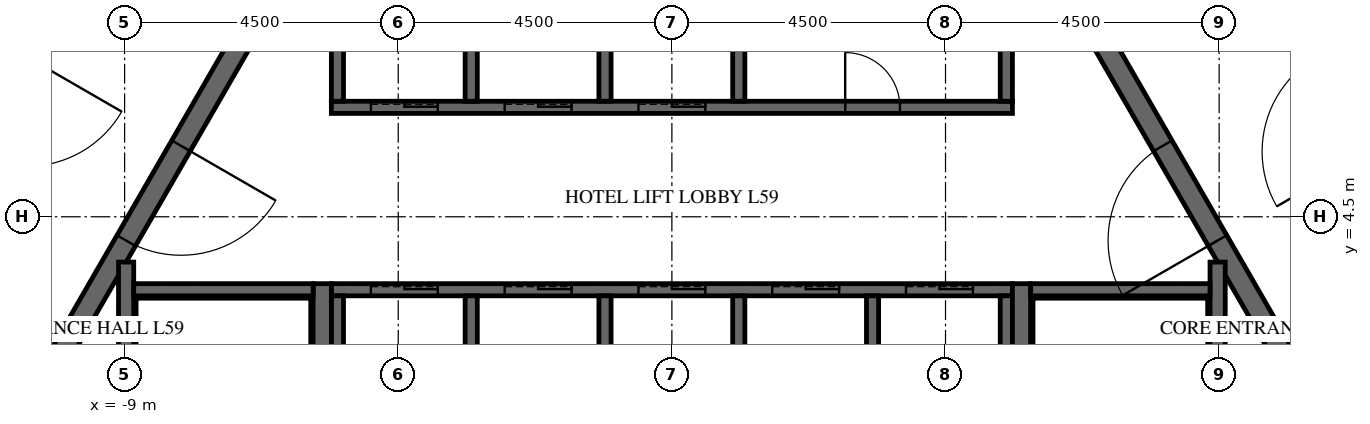
"""IFC4 building model, lengths in metres.
Left out: names, types, materials, properties, quantities, classifications, styles, units other than length and angle.
Written with IfcOpenShell. Run it as: python <this file> out.ifc"""

import sys

from ifc_helpers import new_model, si_unit, direction, frame, frame_2d, origin, place, context, subcontext, project, spatial, polyline, rectangle, outline, extrude, element, fill, save


model = new_model("IFC4")
c1 = context("Model", 3, precision=1e-05, world=origin(), true_north=direction((0.0, 1.0)))
c2 = subcontext(c1, "Body", "Model", "MODEL_VIEW")
j1 = project(units=[si_unit("LENGTHUNIT", "METRE"), si_unit("PLANEANGLEUNIT", "RADIAN")], contexts=[c1])
p1 = place(None, origin())
s1 = spatial("IfcSite", under=j1, at=p1, CompositionType="ELEMENT")
p2 = place(p1, origin())
s2 = spatial("IfcBuilding", under=s1, at=p2, CompositionType="ELEMENT")
p3 = place(p2, frame((0.0, 0.0, 246.3)))
s3 = spatial("IfcBuildingStorey", under=s2, at=p3, CompositionType="ELEMENT", Elevation=246.3)
p4 = place(p3, frame((-7.361, 12.75, -0.15), z_axis=(0.0, 0.0, 1.0), x_axis=(-0.50000571537, -0.866022103989, 0.0)))
e1 = element("IfcWall", 1, at=p4, inside=s3, PredefinedType="SHEAR", context=c2, shape_type="SweptSolid", body=[
    extrude(outline(polyline([(-0.144, -0.25), (14.867, -0.25), (14.578, 0.25), (0.144, 0.25), (-0.144, -0.25)])), origin(), (0.0, 0.0, 1.0), 3.75),
])
p5 = place(p4, frame((6.49, 0.0, 0.15)))
e2 = element("IfcOpeningElement", 2, at=p5, cuts=e1, PredefinedType="OPENING", context=c2, shape_type="SweptSolid", body=[
    extrude(rectangle(XDim=1.8, YDim=2.4, at=frame_2d((0.9, 1.2))), frame((0.0, 0.26, 0.0), z_axis=(0.0, -1.0, 0.0), x_axis=(1.0, 0.0, 0.0)), (0.0, 0.0, 1.0), 0.52),
])
p6 = place(p3, frame((14.722, 0.0, -0.15), z_axis=(0.0, 0.0, 1.0), x_axis=(-0.50000571537, 0.866022103989, 0.0)))
e3 = element("IfcWall", 3, at=p6, inside=s3, PredefinedType="SHEAR", context=c2, shape_type="SweptSolid", body=[
    extrude(outline(polyline([(-0.144, -0.25), (14.867, -0.25), (14.578, 0.25), (0.144, 0.25), (-0.144, -0.25)])), origin(), (0.0, 0.0, 1.0), 3.75),
])
p7 = place(p6, frame((6.432, 0.0, 0.15)))
e4 = element("IfcOpeningElement", 4, at=p7, cuts=e3, PredefinedType="OPENING", context=c2, shape_type="SweptSolid", body=[
    extrude(rectangle(XDim=1.8, YDim=2.4, at=frame_2d((0.9, 1.2))), frame((0.0, 0.26, 0.0), z_axis=(0.0, -1.0, 0.0), x_axis=(1.0, 0.0, 0.0)), (0.0, 0.0, 1.0), 0.52),
])
p8 = place(p3, frame((-5.673, 9.825, -0.15), z_axis=(0.0, 0.0, 1.0), x_axis=(-0.499995046907, -0.866028263435, 0.0)))
e5 = element("IfcWall", 5, at=p8, inside=s3, PredefinedType="SHEAR", context=c2, shape_type="SweptSolid", body=[
    extrude(outline(polyline([(-0.101, -0.175), (11.446, -0.175), (11.244, 0.175), (0.101, 0.175), (-0.101, -0.175)])), origin(), (0.0, 0.0, 1.0), 3.75),
])
p9 = place(p8, frame((4.801, 0.0, 0.15)))
e6 = element("IfcOpeningElement", 6, at=p9, cuts=e5, PredefinedType="OPENING", context=c2, shape_type="SweptSolid", body=[
    extrude(rectangle(XDim=1.8, YDim=2.4, at=frame_2d((0.9, 1.2))), frame((0.0, 0.185, 0.0), z_axis=(0.0, -1.0, 0.0), x_axis=(1.0, 0.0, 0.0)), (0.0, 0.0, 1.0), 0.37),
])
p10 = place(p3, frame((11.345, 0.0, -0.15), z_axis=(0.0, 0.0, 1.0), x_axis=(-0.499995046907, 0.866028263435, 0.0)))
e7 = element("IfcWall", 7, at=p10, inside=s3, PredefinedType="SHEAR", context=c2, shape_type="SweptSolid", body=[
    extrude(outline(polyline([(-0.101, -0.175), (11.446, -0.175), (11.244, 0.175), (0.101, 0.175), (-0.101, -0.175)])), origin(), (0.0, 0.0, 1.0), 3.75),
])
p11 = place(p10, frame((4.744, 0.0, 0.15)))
e8 = element("IfcOpeningElement", 8, at=p11, cuts=e7, PredefinedType="OPENING", context=c2, shape_type="SweptSolid", body=[
    extrude(rectangle(XDim=1.8, YDim=2.4, at=frame_2d((0.9, 1.2))), frame((0.0, 0.185, 0.0), z_axis=(0.0, -1.0, 0.0), x_axis=(1.0, 0.0, 0.0)), (0.0, 0.0, 1.0), 0.37),
])
p12 = place(p3, frame((-5.6, 6.3, -0.25), z_axis=(0.0, 0.0, 1.0), x_axis=(1.0, 0.0, 0.0)))
e9 = element("IfcWall", 9, at=p12, inside=s3, PredefinedType="SHEAR", context=c2, shape_type="SweptSolid", body=[
    extrude(rectangle(XDim=11.2, YDim=0.2, at=frame_2d((5.6, 0.0))), origin(), (0.0, 0.0, 1.0), 3.9),
])
p13 = place(p12, frame((8.45, 0.0, 0.25)))
e10 = element("IfcOpeningElement", 10, at=p13, cuts=e9, PredefinedType="OPENING", context=c2, shape_type="SweptSolid", body=[
    extrude(rectangle(XDim=0.9, YDim=2.1, at=frame_2d((0.45, 1.05))), frame((0.0, 0.11, 0.0), z_axis=(0.0, -1.0, 0.0), x_axis=(1.0, 0.0, 0.0)), (0.0, 0.0, 1.0), 0.22),
])
p14 = place(p12, frame((0.65, 0.0, 0.25)))
e11 = element("IfcOpeningElement", 11, at=p14, cuts=e9, PredefinedType="OPENING", context=c2, shape_type="SweptSolid", body=[
    extrude(rectangle(XDim=1.1, YDim=2.1, at=frame_2d((0.55, 1.05))), frame((0.0, 0.11, 0.0), z_axis=(0.0, -1.0, 0.0), x_axis=(1.0, 0.0, 0.0)), (0.0, 0.0, 1.0), 0.22),
])
p15 = place(p12, frame((2.85, 0.0, 0.25)))
e12 = element("IfcOpeningElement", 12, at=p15, cuts=e9, PredefinedType="OPENING", context=c2, shape_type="SweptSolid", body=[
    extrude(rectangle(XDim=1.1, YDim=2.1, at=frame_2d((0.55, 1.05))), frame((0.0, 0.11, 0.0), z_axis=(0.0, -1.0, 0.0), x_axis=(1.0, 0.0, 0.0)), (0.0, 0.0, 1.0), 0.22),
])
p16 = place(p12, frame((5.05, 0.0, 0.25)))
e13 = element("IfcOpeningElement", 13, at=p16, cuts=e9, PredefinedType="OPENING", context=c2, shape_type="SweptSolid", body=[
    extrude(rectangle(XDim=1.1, YDim=2.1, at=frame_2d((0.55, 1.05))), frame((0.0, 0.11, 0.0), z_axis=(0.0, -1.0, 0.0), x_axis=(1.0, 0.0, 0.0)), (0.0, 0.0, 1.0), 0.22),
])
for number, where, z_axis, x_axis in (
    (14, (-5.5, 6.4, -0.25), (0.0, 0.0, 1.0), (0.0, 1.0, 0.0)),
    (15, (-3.3, 6.4, -0.25), (0.0, 0.0, 1.0), (0.0, 1.0, 0.0)),
    (16, (-1.1, 6.4, -0.25), (0.0, 0.0, 1.0), (0.0, 1.0, 0.0)),
    (17, (1.1, 6.4, -0.25), (0.0, 0.0, 1.0), (0.0, 1.0, 0.0)),
    (18, (5.5, 6.4, -0.25), (0.0, 0.0, 1.0), (0.0, 1.0, 0.0)),
):
    element("IfcWall", number, at=place(p3, frame(where, z_axis=z_axis, x_axis=x_axis)), inside=s3, PredefinedType="SHEAR", context=c2, shape_type="SweptSolid", body=[
        extrude(rectangle(XDim=2.9, YDim=0.2, at=frame_2d((1.45, 0.0))), origin(), (0.0, 0.0, 1.0), 3.9),
    ])
p17 = place(p3, frame((-5.6, 3.3, -0.25), z_axis=(0.0, 0.0, 1.0), x_axis=(1.0, 0.0, 0.0)))
e19 = element("IfcWall", 19, at=p17, inside=s3, PredefinedType="SHEAR", context=c2, shape_type="SweptSolid", body=[
    extrude(rectangle(XDim=11.2, YDim=0.2, at=frame_2d((5.6, 0.0))), origin(), (0.0, 0.0, 1.0), 3.9),
])
p18 = place(p17, frame((0.65, 0.0, 0.25)))
e20 = element("IfcOpeningElement", 20, at=p18, cuts=e19, PredefinedType="OPENING", context=c2, shape_type="SweptSolid", body=[
    extrude(rectangle(XDim=1.1, YDim=2.1, at=frame_2d((0.55, 1.05))), frame((0.0, 0.11, 0.0), z_axis=(0.0, -1.0, 0.0), x_axis=(1.0, 0.0, 0.0)), (0.0, 0.0, 1.0), 0.22),
])
p19 = place(p17, frame((2.85, 0.0, 0.25)))
e21 = element("IfcOpeningElement", 21, at=p19, cuts=e19, PredefinedType="OPENING", context=c2, shape_type="SweptSolid", body=[
    extrude(rectangle(XDim=1.1, YDim=2.1, at=frame_2d((0.55, 1.05))), frame((0.0, 0.11, 0.0), z_axis=(0.0, -1.0, 0.0), x_axis=(1.0, 0.0, 0.0)), (0.0, 0.0, 1.0), 0.22),
])
p20 = place(p17, frame((5.05, 0.0, 0.25)))
e22 = element("IfcOpeningElement", 22, at=p20, cuts=e19, PredefinedType="OPENING", context=c2, shape_type="SweptSolid", body=[
    extrude(rectangle(XDim=1.1, YDim=2.1, at=frame_2d((0.55, 1.05))), frame((0.0, 0.11, 0.0), z_axis=(0.0, -1.0, 0.0), x_axis=(1.0, 0.0, 0.0)), (0.0, 0.0, 1.0), 0.22),
])
p21 = place(p17, frame((7.25, 0.0, 0.25)))
e23 = element("IfcOpeningElement", 23, at=p21, cuts=e19, PredefinedType="OPENING", context=c2, shape_type="SweptSolid", body=[
    extrude(rectangle(XDim=1.1, YDim=2.1, at=frame_2d((0.55, 1.05))), frame((0.0, 0.11, 0.0), z_axis=(0.0, -1.0, 0.0), x_axis=(1.0, 0.0, 0.0)), (0.0, 0.0, 1.0), 0.22),
])
p22 = place(p17, frame((9.45, 0.0, 0.25)))
e24 = element("IfcOpeningElement", 24, at=p22, cuts=e19, PredefinedType="OPENING", context=c2, shape_type="SweptSolid", body=[
    extrude(rectangle(XDim=1.1, YDim=2.1, at=frame_2d((0.55, 1.05))), frame((0.0, 0.11, 0.0), z_axis=(0.0, -1.0, 0.0), x_axis=(1.0, 0.0, 0.0)), (0.0, 0.0, 1.0), 0.22),
])
for number, where, z_axis, x_axis in (
    (25, (-5.5, 0.1, -0.25), (0.0, 0.0, 1.0), (0.0, 1.0, 0.0)),
    (26, (-3.3, 0.1, -0.25), (0.0, 0.0, 1.0), (0.0, 1.0, 0.0)),
    (27, (-1.1, 0.1, -0.25), (0.0, 0.0, 1.0), (0.0, 1.0, 0.0)),
    (28, (1.1, 0.1, -0.25), (0.0, 0.0, 1.0), (0.0, 1.0, 0.0)),
    (29, (3.3, 0.1, -0.25), (0.0, 0.0, 1.0), (0.0, 1.0, 0.0)),
    (30, (5.5, 0.1, -0.25), (0.0, 0.0, 1.0), (0.0, 1.0, 0.0)),
):
    element("IfcWall", number, at=place(p3, frame(where, z_axis=z_axis, x_axis=x_axis)), inside=s3, PredefinedType="SHEAR", context=c2, shape_type="SweptSolid", body=[
        extrude(rectangle(XDim=3.1, YDim=0.2, at=frame_2d((1.55, 0.0))), origin(), (0.0, 0.0, 1.0), 3.9),
    ])
p23 = place(p3, frame((5.75, -3.4, -0.25), z_axis=(0.0, 0.0, 1.0), x_axis=(0.0, 1.0, 0.0)))
e31 = element("IfcWall", 31, at=p23, inside=s3, PredefinedType="SHEAR", context=c2, shape_type="SweptSolid", body=[
    extrude(rectangle(XDim=6.8, YDim=0.3, at=frame_2d((3.4, 0.0))), origin(), (0.0, 0.0, 1.0), 3.9),
])
p24 = place(p3, frame((8.975, -3.755, -0.25), z_axis=(0.0, 0.0, 1.0), x_axis=(0.0, 1.0, 0.0)))
e32 = element("IfcWall", 32, at=p24, inside=s3, PredefinedType="SHEAR", context=c2, shape_type="SweptSolid", body=[
    extrude(rectangle(XDim=7.51, YDim=0.25, at=frame_2d((3.755, 0.0))), origin(), (0.0, 0.0, 1.0), 3.9),
])
p25 = place(p3, frame((5.9, 3.3, -0.25), z_axis=(0.0, 0.0, 1.0), x_axis=(1.0, 0.0, 0.0)))
e33 = element("IfcWall", 33, at=p25, inside=s3, PredefinedType="SHEAR", context=c2, shape_type="SweptSolid", body=[
    extrude(rectangle(XDim=2.95, YDim=0.2, at=frame_2d((1.475, 0.0))), origin(), (0.0, 0.0, 1.0), 3.9),
])
p26 = place(p3, frame((-5.75, -3.4, -0.25), z_axis=(0.0, 0.0, 1.0), x_axis=(0.0, 1.0, 0.0)))
e34 = element("IfcWall", 34, at=p26, inside=s3, PredefinedType="SHEAR", context=c2, shape_type="SweptSolid", body=[
    extrude(rectangle(XDim=6.8, YDim=0.3, at=frame_2d((3.4, 0.0))), origin(), (0.0, 0.0, 1.0), 3.9),
])
p27 = place(p3, frame((-8.975, -3.755, -0.25), z_axis=(0.0, 0.0, 1.0), x_axis=(0.0, 1.0, 0.0)))
e35 = element("IfcWall", 35, at=p27, inside=s3, PredefinedType="SHEAR", context=c2, shape_type="SweptSolid", body=[
    extrude(rectangle(XDim=7.51, YDim=0.25, at=frame_2d((3.755, 0.0))), origin(), (0.0, 0.0, 1.0), 3.9),
])
p28 = place(p3, frame((-8.85, 3.3, -0.25), z_axis=(0.0, 0.0, 1.0), x_axis=(1.0, 0.0, 0.0)))
e36 = element("IfcWall", 36, at=p28, inside=s3, PredefinedType="SHEAR", context=c2, shape_type="SweptSolid", body=[
    extrude(rectangle(XDim=2.95, YDim=0.2, at=frame_2d((1.475, 0.0))), origin(), (0.0, 0.0, 1.0), 3.9),
])
p29 = place(p3, frame((-8.673, 14.978, 0.0), z_axis=(0.0, 0.0, 1.0), x_axis=(-0.50000700621, -0.86602135871, 0.0)))
e37 = element("IfcWall", 37, at=p29, inside=s3, PredefinedType="PARTITIONING", context=c2, shape_type="SweptSolid", body=[
    extrude(rectangle(XDim=14.928, YDim=0.15, at=frame_2d((7.464, 0.0))), origin(), (0.0, 0.0, 1.0), 2.838),
])
p30 = place(p29, frame((4.454, 0.0, 0.0)))
e38 = element("IfcOpeningElement", 38, at=p30, cuts=e37, PredefinedType="OPENING", context=c2, shape_type="SweptSolid", body=[
    extrude(rectangle(XDim=1.0, YDim=2.1, at=frame_2d((0.5, 1.05))), frame((0.0, 0.085, 0.0), z_axis=(0.0, -1.0, 0.0), x_axis=(1.0, 0.0, 0.0)), (0.0, 0.0, 1.0), 0.17),
])
p31 = place(p29, frame((11.264, 0.0, 0.0)))
e39 = element("IfcOpeningElement", 39, at=p31, cuts=e37, PredefinedType="OPENING", context=c2, shape_type="SweptSolid", body=[
    extrude(rectangle(XDim=1.0, YDim=2.1, at=frame_2d((0.5, 1.05))), frame((0.0, 0.085, 0.0), z_axis=(0.0, -1.0, 0.0), x_axis=(1.0, 0.0, 0.0)), (0.0, 0.0, 1.0), 0.17),
])
p32 = place(p3, frame((17.277, 0.075, 0.0), z_axis=(0.0, 0.0, 1.0), x_axis=(-0.499998228944, 0.866026426302, 0.0)))
e40 = element("IfcWall", 40, at=p32, inside=s3, PredefinedType="PARTITIONING", context=c2, shape_type="SweptSolid", body=[
    extrude(rectangle(XDim=14.867, YDim=0.15, at=frame_2d((7.433, 0.0))), origin(), (0.0, 0.0, 1.0), 2.838),
])
p33 = place(p32, frame((4.345, 0.0, 0.0)))
e41 = element("IfcOpeningElement", 41, at=p33, cuts=e40, PredefinedType="OPENING", context=c2, shape_type="SweptSolid", body=[
    extrude(rectangle(XDim=1.0, YDim=2.1, at=frame_2d((0.5, 1.05))), frame((0.0, 0.085, 0.0), z_axis=(0.0, -1.0, 0.0), x_axis=(1.0, 0.0, 0.0)), (0.0, 0.0, 1.0), 0.17),
])
p34 = place(p32, frame((8.51, 0.0, 0.0)))
e42 = element("IfcOpeningElement", 42, at=p34, cuts=e40, PredefinedType="OPENING", context=c2, shape_type="SweptSolid", body=[
    extrude(rectangle(XDim=1.0, YDim=2.1, at=frame_2d((0.5, 1.05))), frame((0.0, 0.085, 0.0), z_axis=(0.0, -1.0, 0.0), x_axis=(1.0, 0.0, 0.0)), (0.0, 0.0, 1.0), 0.17),
])
p35 = place(p9, origin())
e43 = element("IfcDoor", 43, at=p35, inside=s3, OperationType="DOUBLE_DOOR_SINGLE_SWING", PredefinedType="DOOR", context=c2, shape_type="SweptSolid", body=[
    extrude(rectangle(XDim=1.8, YDim=2.4, at=frame_2d((0.9, 1.2))), frame((0.0, 0.025, 0.0), z_axis=(0.0, -1.0, 0.0), x_axis=(1.0, 0.0, 0.0)), (0.0, 0.0, 1.0), 0.05),
])
fill(e6, e43)
p36 = place(p11, origin())
e44 = element("IfcDoor", 44, at=p36, inside=s3, OperationType="DOUBLE_DOOR_SINGLE_SWING", PredefinedType="DOOR", context=c2, shape_type="SweptSolid", body=[
    extrude(rectangle(XDim=1.8, YDim=2.4, at=frame_2d((0.9, 1.2))), frame((0.0, 0.025, 0.0), z_axis=(0.0, -1.0, 0.0), x_axis=(1.0, 0.0, 0.0)), (0.0, 0.0, 1.0), 0.05),
])
fill(e8, e44)
p37 = place(p13, origin())
e45 = element("IfcDoor", 45, at=p37, inside=s3, OperationType="SINGLE_SWING_LEFT", PredefinedType="DOOR", context=c2, shape_type="SweptSolid", body=[
    extrude(rectangle(XDim=0.9, YDim=2.1, at=frame_2d((0.45, 1.05))), frame((0.0, 0.025, 0.0), z_axis=(0.0, -1.0, 0.0), x_axis=(1.0, 0.0, 0.0)), (0.0, 0.0, 1.0), 0.05),
])
fill(e10, e45)
p38 = place(p14, origin())
e46 = element("IfcDoor", 46, at=p38, inside=s3, OperationType="SLIDING_TO_LEFT", PredefinedType="DOOR", context=c2, shape_type="SweptSolid", body=[
    extrude(rectangle(XDim=1.1, YDim=2.1, at=frame_2d((0.55, 1.05))), frame((0.0, 0.025, 0.0), z_axis=(0.0, -1.0, 0.0), x_axis=(1.0, 0.0, 0.0)), (0.0, 0.0, 1.0), 0.05),
])
fill(e11, e46)
p39 = place(p15, origin())
e47 = element("IfcDoor", 47, at=p39, inside=s3, OperationType="SLIDING_TO_LEFT", PredefinedType="DOOR", context=c2, shape_type="SweptSolid", body=[
    extrude(rectangle(XDim=1.1, YDim=2.1, at=frame_2d((0.55, 1.05))), frame((0.0, 0.025, 0.0), z_axis=(0.0, -1.0, 0.0), x_axis=(1.0, 0.0, 0.0)), (0.0, 0.0, 1.0), 0.05),
])
fill(e12, e47)
p40 = place(p16, origin())
e48 = element("IfcDoor", 48, at=p40, inside=s3, OperationType="SLIDING_TO_LEFT", PredefinedType="DOOR", context=c2, shape_type="SweptSolid", body=[
    extrude(rectangle(XDim=1.1, YDim=2.1, at=frame_2d((0.55, 1.05))), frame((0.0, 0.025, 0.0), z_axis=(0.0, -1.0, 0.0), x_axis=(1.0, 0.0, 0.0)), (0.0, 0.0, 1.0), 0.05),
])
fill(e13, e48)
p41 = place(p18, origin())
e49 = element("IfcDoor", 49, at=p41, inside=s3, OperationType="SLIDING_TO_LEFT", PredefinedType="DOOR", context=c2, shape_type="SweptSolid", body=[
    extrude(rectangle(XDim=1.1, YDim=2.1, at=frame_2d((0.55, 1.05))), frame((0.0, 0.025, 0.0), z_axis=(0.0, -1.0, 0.0), x_axis=(1.0, 0.0, 0.0)), (0.0, 0.0, 1.0), 0.05),
])
fill(e20, e49)
p42 = place(p19, origin())
e50 = element("IfcDoor", 50, at=p42, inside=s3, OperationType="SLIDING_TO_LEFT", PredefinedType="DOOR", context=c2, shape_type="SweptSolid", body=[
    extrude(rectangle(XDim=1.1, YDim=2.1, at=frame_2d((0.55, 1.05))), frame((0.0, 0.025, 0.0), z_axis=(0.0, -1.0, 0.0), x_axis=(1.0, 0.0, 0.0)), (0.0, 0.0, 1.0), 0.05),
])
fill(e21, e50)
p43 = place(p20, origin())
e51 = element("IfcDoor", 51, at=p43, inside=s3, OperationType="SLIDING_TO_LEFT", PredefinedType="DOOR", context=c2, shape_type="SweptSolid", body=[
    extrude(rectangle(XDim=1.1, YDim=2.1, at=frame_2d((0.55, 1.05))), frame((0.0, 0.025, 0.0), z_axis=(0.0, -1.0, 0.0), x_axis=(1.0, 0.0, 0.0)), (0.0, 0.0, 1.0), 0.05),
])
fill(e22, e51)
p44 = place(p21, origin())
e52 = element("IfcDoor", 52, at=p44, inside=s3, OperationType="SLIDING_TO_LEFT", PredefinedType="DOOR", context=c2, shape_type="SweptSolid", body=[
    extrude(rectangle(XDim=1.1, YDim=2.1, at=frame_2d((0.55, 1.05))), frame((0.0, 0.025, 0.0), z_axis=(0.0, -1.0, 0.0), x_axis=(1.0, 0.0, 0.0)), (0.0, 0.0, 1.0), 0.05),
])
fill(e23, e52)
p45 = place(p22, origin())
e53 = element("IfcDoor", 53, at=p45, inside=s3, OperationType="SLIDING_TO_LEFT", PredefinedType="DOOR", context=c2, shape_type="SweptSolid", body=[
    extrude(rectangle(XDim=1.1, YDim=2.1, at=frame_2d((0.55, 1.05))), frame((0.0, 0.025, 0.0), z_axis=(0.0, -1.0, 0.0), x_axis=(1.0, 0.0, 0.0)), (0.0, 0.0, 1.0), 0.05),
])
fill(e24, e53)
save(model, sys.argv[1])
